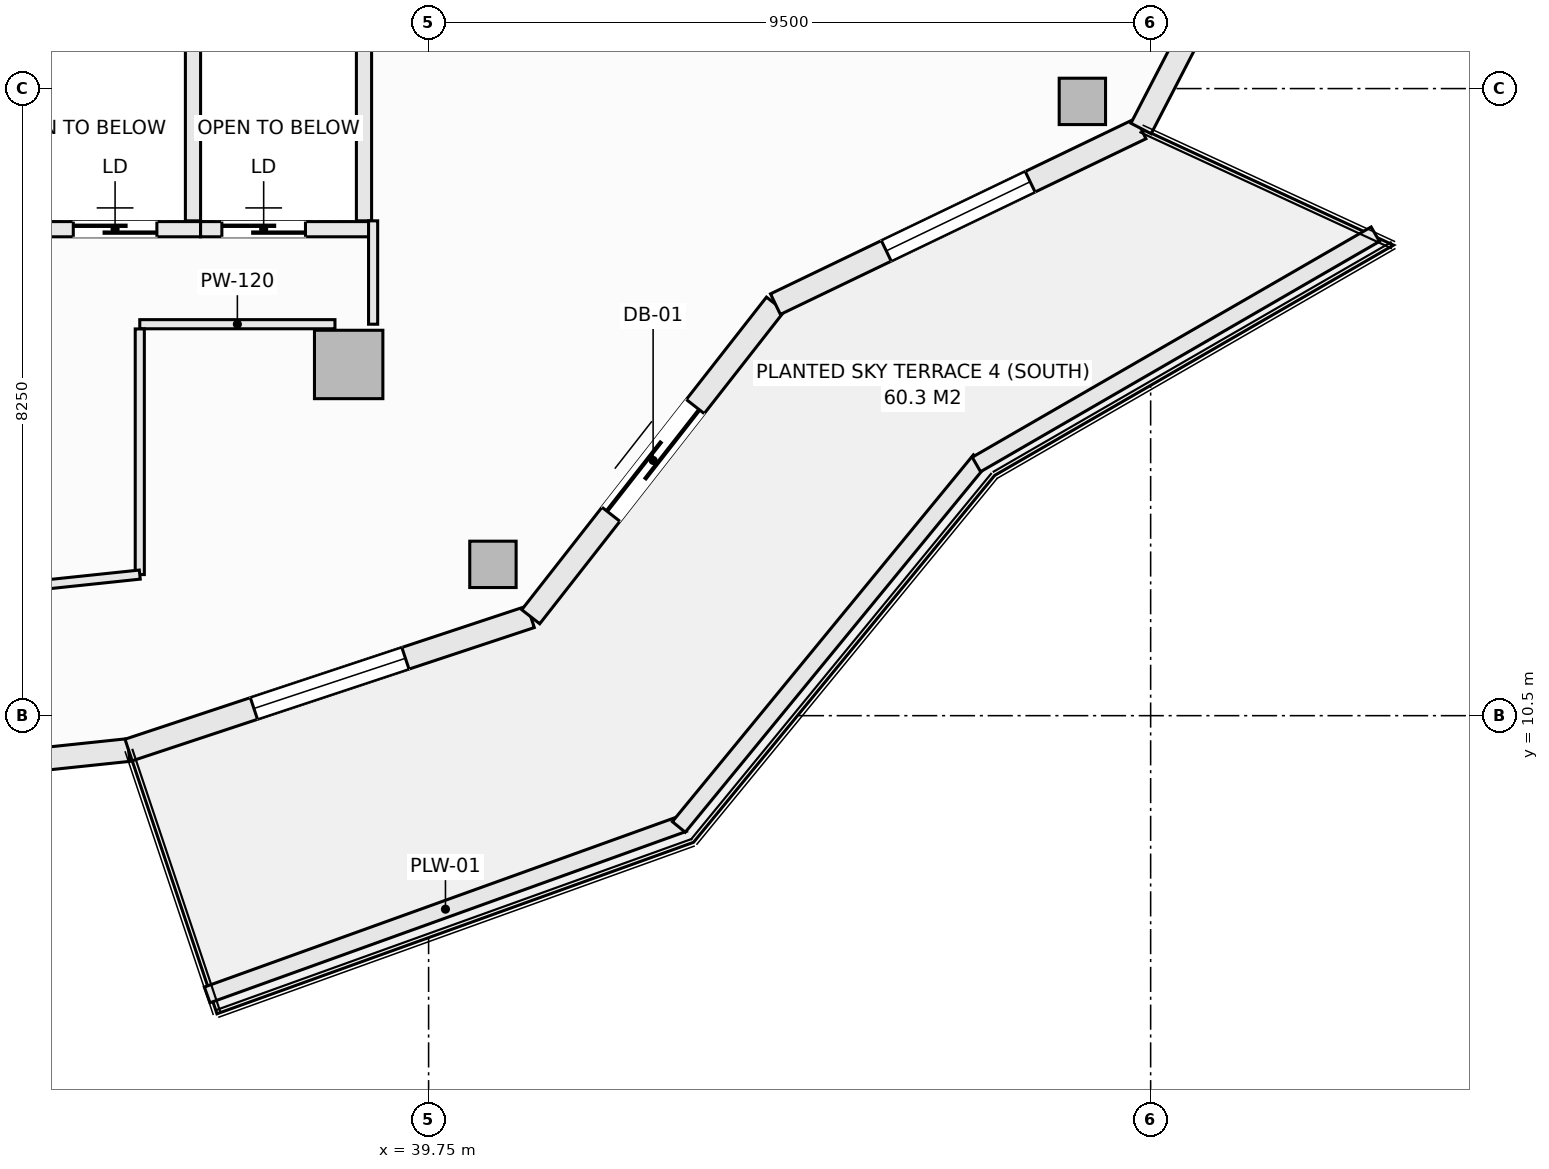
"""IFC4 building model, lengths in metres.
Left out: names, types, materials, properties, quantities, classifications, styles, units other than length and angle.
Written with IfcOpenShell. Run it as: python <this file> out.ifc"""

import sys

from ifc_helpers import new_model, si_unit, direction, frame, frame_2d, origin, origin_2d, place, context, subcontext, project, spatial, rectangle, hollow_rectangle, extrude, element, fill, save


model = new_model("IFC4")
c1 = context("Model", 3, precision=1e-05, world=origin(), true_north=direction((0.0, 1.0)))
c2 = subcontext(c1, "Body", "Model", "MODEL_VIEW")
j1 = project(units=[si_unit("LENGTHUNIT", "METRE"), si_unit("PLANEANGLEUNIT", "RADIAN")], contexts=[c1])
p1 = place(None, origin())
s1 = spatial("IfcSite", under=j1, at=p1, CompositionType="ELEMENT")
p2 = place(p1, origin())
s2 = spatial("IfcBuilding", under=s1, at=p2, CompositionType="ELEMENT")
p3 = place(p2, frame((0.0, 0.0, 142.7)))
s3 = spatial("IfcBuildingStorey", under=s2, at=p3, CompositionType="ELEMENT", Elevation=142.7)
for number, where, z_axis, x_axis in (
    (1, (40.596, 12.49, -0.27), (0.0, 0.0, 1.0), (1.0, 0.0, 0.0)),
    (2, (48.352, 18.581, -0.27), (0.0, 0.0, 1.0), (1.0, 0.0, 0.0)),
):
    element("IfcColumn", number, at=place(p3, frame(where, z_axis=z_axis, x_axis=x_axis)), inside=s3, PredefinedType="COLUMN", context=c2, shape_type="SweptSolid", body=[
        extrude(hollow_rectangle(XDim=0.61, YDim=0.61, WallThickness=0.025, at=origin_2d()), origin(), (0.0, 0.0, 1.0), 3.4),
    ])
p4 = place(p3, frame((38.698, 15.121, -0.27), z_axis=(0.0, 0.0, 1.0), x_axis=(1.0, 0.0, 0.0)))
e3 = element("IfcColumn", 3, at=p4, inside=s3, PredefinedType="COLUMN", context=c2, shape_type="SweptSolid", body=[
    extrude(rectangle(XDim=0.9, YDim=0.9, at=origin_2d()), origin(), (0.0, 0.0, 1.0), 3.4),
])
p5 = place(p3, frame((30.125, 9.45, 0.0), z_axis=(0.0, 0.0, 1.0), x_axis=(0.994496545245, 0.104769372887, 0.0)))
e4 = element("IfcWall", 4, at=p5, inside=s3, PredefinedType="SOLIDWALL", context=c2, shape_type="SweptSolid", body=[
    extrude(rectangle(XDim=5.709, YDim=0.3, at=frame_2d((2.854, 0.0))), origin(), (0.0, 0.0, 1.0), 2.653),
])
p6 = place(p5, frame((1.805, 0.0, 0.74)))
e5 = element("IfcOpeningElement", 5, at=p6, cuts=e4, PredefinedType="OPENING", context=c2, shape_type="SweptSolid", body=[
    extrude(rectangle(XDim=2.1, YDim=1.7, at=frame_2d((1.05, 0.85))), frame((0.0, 0.16, 0.0), z_axis=(0.0, -1.0, 0.0), x_axis=(1.0, 0.0, 0.0)), (0.0, 0.0, 1.0), 0.32),
])
p7 = place(p3, frame((35.803, 10.048, 0.0), z_axis=(0.0, 0.0, 1.0), x_axis=(0.949246811547, 0.314532177636, 0.0)))
e6 = element("IfcWall", 6, at=p7, inside=s3, PredefinedType="SOLIDWALL", context=c2, shape_type="SweptSolid", body=[
    extrude(rectangle(XDim=5.574, YDim=0.3, at=frame_2d((2.787, 0.0))), origin(), (0.0, 0.0, 1.0), 2.653),
])
p8 = place(p7, frame((1.737, 0.0, 0.74)))
e7 = element("IfcOpeningElement", 7, at=p8, cuts=e6, PredefinedType="OPENING", context=c2, shape_type="SweptSolid", body=[
    extrude(rectangle(XDim=2.1, YDim=1.7, at=frame_2d((1.05, 0.85))), frame((0.0, 0.16, 0.0), z_axis=(0.0, -1.0, 0.0), x_axis=(1.0, 0.0, 0.0)), (0.0, 0.0, 1.0), 0.32),
])
p9 = place(p3, frame((41.094, 11.801, 0.0), z_axis=(0.0, 0.0, 1.0), x_axis=(0.616429245738, 0.787410302828, 0.0)))
e8 = element("IfcWall", 8, at=p9, inside=s3, PredefinedType="SOLIDWALL", context=c2, shape_type="SweptSolid", body=[
    extrude(rectangle(XDim=5.223, YDim=0.3, at=frame_2d((2.612, 0.0))), origin(), (0.0, 0.0, 1.0), 2.653),
])
p10 = place(p9, frame((1.712, 0.0, 0.0)))
e9 = element("IfcOpeningElement", 9, at=p10, cuts=e8, PredefinedType="OPENING", context=c2, shape_type="SweptSolid", body=[
    extrude(rectangle(XDim=1.8, YDim=2.25, at=frame_2d((0.9, 1.125))), frame((0.0, 0.16, 0.0), z_axis=(0.0, -1.0, 0.0), x_axis=(1.0, 0.0, 0.0)), (0.0, 0.0, 1.0), 0.32),
])
p11 = place(p3, frame((44.313, 15.914, 0.0), z_axis=(0.0, 0.0, 1.0), x_axis=(0.901353070301, 0.433085029363, 0.0)))
e10 = element("IfcWall", 10, at=p11, inside=s3, PredefinedType="SOLIDWALL", context=c2, shape_type="SweptSolid", body=[
    extrude(rectangle(XDim=5.336, YDim=0.3, at=frame_2d((2.668, 0.0))), origin(), (0.0, 0.0, 1.0), 2.653),
])
p12 = place(p11, frame((1.618, 0.0, 0.74)))
e11 = element("IfcOpeningElement", 11, at=p12, cuts=e10, PredefinedType="OPENING", context=c2, shape_type="SweptSolid", body=[
    extrude(rectangle(XDim=2.1, YDim=1.7, at=frame_2d((1.05, 0.85))), frame((0.0, 0.16, 0.0), z_axis=(0.0, -1.0, 0.0), x_axis=(1.0, 0.0, 0.0)), (0.0, 0.0, 1.0), 0.32),
])
p13 = place(p3, frame((49.123, 18.225, 0.0), z_axis=(0.0, 0.0, 1.0), x_axis=(0.459810251451, 0.888017191647, 0.0)))
e12 = element("IfcWall", 12, at=p13, inside=s3, PredefinedType="SOLIDWALL", context=c2, shape_type="SweptSolid", body=[
    extrude(rectangle(XDim=4.766, YDim=0.3, at=frame_2d((2.383, 0.0))), origin(), (0.0, 0.0, 1.0), 2.653),
])
p14 = place(p13, frame((1.333, 0.0, 0.74)))
e13 = element("IfcOpeningElement", 13, at=p14, cuts=e12, PredefinedType="OPENING", context=c2, shape_type="SweptSolid", body=[
    extrude(rectangle(XDim=2.1, YDim=1.7, at=frame_2d((1.05, 0.85))), frame((0.0, 0.16, 0.0), z_axis=(0.0, -1.0, 0.0), x_axis=(1.0, 0.0, 0.0)), (0.0, 0.0, 1.0), 0.32),
])
p15 = place(p3, frame((36.837, 6.826, 0.0), z_axis=(0.0, 0.0, 1.0), x_axis=(0.940948576924, 0.338549517184, 0.0)))
e14 = element("IfcWall", 14, at=p15, inside=s3, PredefinedType="PARAPET", context=c2, shape_type="SweptSolid", body=[
    extrude(rectangle(XDim=6.664, YDim=0.22, at=frame_2d((3.332, 0.0))), origin(), (0.0, 0.0, 1.0), 0.52),
])
p16 = place(p3, frame((43.042, 9.036, 0.0), z_axis=(0.0, 0.0, 1.0), x_axis=(0.634429234628, 0.77298094818, 0.0)))
e15 = element("IfcWall", 15, at=p16, inside=s3, PredefinedType="PARAPET", context=c2, shape_type="SweptSolid", body=[
    extrude(rectangle(XDim=6.245, YDim=0.22, at=frame_2d((3.123, 0.0))), origin(), (0.0, 0.0, 1.0), 0.52),
])
p17 = place(p3, frame((46.958, 13.805, 0.0), z_axis=(0.0, 0.0, 1.0), x_axis=(0.866058128659, 0.499943314571, 0.0)))
e16 = element("IfcWall", 16, at=p17, inside=s3, PredefinedType="PARAPET", context=c2, shape_type="SweptSolid", body=[
    extrude(rectangle(XDim=6.06, YDim=0.22, at=frame_2d((3.03, 0.0))), origin(), (0.0, 0.0, 1.0), 0.52),
])
p18 = place(p3, frame((34.5, 16.9, 0.0), z_axis=(0.0, 0.0, 1.0), x_axis=(1.0, 0.0, 0.0)))
e17 = element("IfcWall", 17, at=p18, inside=s3, PredefinedType="SOLIDWALL", context=c2, shape_type="SweptSolid", body=[
    extrude(rectangle(XDim=2.25, YDim=0.2, at=frame_2d((1.125, 0.0))), origin(), (0.0, 0.0, 1.0), 3.13),
])
p19 = place(p18, frame((0.575, 0.0, 0.0)))
e18 = element("IfcOpeningElement", 18, at=p19, cuts=e17, PredefinedType="OPENING", context=c2, shape_type="SweptSolid", body=[
    extrude(rectangle(XDim=1.1, YDim=2.2, at=frame_2d((0.55, 1.1))), frame((0.0, 0.11, 0.0), z_axis=(0.0, -1.0, 0.0), x_axis=(1.0, 0.0, 0.0)), (0.0, 0.0, 1.0), 0.22),
])
p20 = place(p3, frame((36.65, 17.01, 0.0), z_axis=(0.0, 0.0, 1.0), x_axis=(0.0, 1.0, 0.0)))
e19 = element("IfcWall", 19, at=p20, inside=s3, PredefinedType="SOLIDWALL", context=c2, shape_type="SweptSolid", body=[
    extrude(rectangle(XDim=2.43, YDim=0.2, at=frame_2d((1.215, 0.0))), origin(), (0.0, 0.0, 1.0), 3.13),
])
p21 = place(p3, frame((36.75, 16.9, 0.0), z_axis=(0.0, 0.0, 1.0), x_axis=(1.0, 0.0, 0.0)))
e20 = element("IfcWall", 20, at=p21, inside=s3, PredefinedType="SOLIDWALL", context=c2, shape_type="SweptSolid", body=[
    extrude(rectangle(XDim=2.25, YDim=0.2, at=frame_2d((1.125, 0.0))), origin(), (0.0, 0.0, 1.0), 3.13),
])
p22 = place(p21, frame((0.28, 0.0, 0.0)))
e21 = element("IfcOpeningElement", 21, at=p22, cuts=e20, PredefinedType="OPENING", context=c2, shape_type="SweptSolid", body=[
    extrude(rectangle(XDim=1.1, YDim=2.2, at=frame_2d((0.55, 1.1))), frame((0.0, 0.11, 0.0), z_axis=(0.0, -1.0, 0.0), x_axis=(1.0, 0.0, 0.0)), (0.0, 0.0, 1.0), 0.22),
])
p23 = place(p3, frame((38.9, 17.01, 0.0), z_axis=(0.0, 0.0, 1.0), x_axis=(0.0, 1.0, 0.0)))
e22 = element("IfcWall", 22, at=p23, inside=s3, PredefinedType="SOLIDWALL", context=c2, shape_type="SweptSolid", body=[
    extrude(rectangle(XDim=2.43, YDim=0.2, at=frame_2d((1.215, 0.0))), origin(), (0.0, 0.0, 1.0), 3.13),
])
p24 = place(p3, frame((39.02, 15.65, 0.0), z_axis=(0.0, 0.0, 1.0), x_axis=(0.0, 1.0, 0.0)))
e23 = element("IfcWall", 23, at=p24, inside=s3, PredefinedType="PARTITIONING", context=c2, shape_type="SweptSolid", body=[
    extrude(rectangle(XDim=1.36, YDim=0.12, at=frame_2d((0.68, 0.0))), origin(), (0.0, 0.0, 1.0), 2.505),
])
p25 = place(p3, frame((35.95, 15.65, 0.0), z_axis=(0.0, 0.0, 1.0), x_axis=(1.0, 0.0, 0.0)))
e24 = element("IfcWall", 24, at=p25, inside=s3, PredefinedType="PARTITIONING", context=c2, shape_type="SweptSolid", body=[
    extrude(rectangle(XDim=2.568, YDim=0.12, at=frame_2d((1.284, 0.0))), origin(), (0.0, 0.0, 1.0), 3.13),
])
p26 = place(p3, frame((35.95, 12.356, 0.0), z_axis=(0.0, 0.0, 1.0), x_axis=(0.0, 1.0, 0.0)))
e25 = element("IfcWall", 25, at=p26, inside=s3, PredefinedType="PARTITIONING", context=c2, shape_type="SweptSolid", body=[
    extrude(rectangle(XDim=3.232, YDim=0.12, at=frame_2d((1.616, 0.0))), origin(), (0.0, 0.0, 1.0), 3.13),
])
p27 = place(p3, frame((30.195, 11.75, 0.0), z_axis=(0.0, 0.0, 1.0), x_axis=(0.994502215954, 0.104715531139, 0.0)))
e26 = element("IfcWall", 26, at=p27, inside=s3, PredefinedType="PARTITIONING", context=c2, shape_type="SweptSolid", body=[
    extrude(rectangle(XDim=5.787, YDim=0.12, at=frame_2d((2.893, 0.0))), origin(), (0.0, 0.0, 1.0), 3.13),
])
p28 = place(p27, frame((2.758, 0.0, 0.0)))
e27 = element("IfcOpeningElement", 27, at=p28, cuts=e26, PredefinedType="OPENING", context=c2, shape_type="SweptSolid", body=[
    extrude(rectangle(XDim=0.95, YDim=2.1, at=frame_2d((0.475, 1.05))), frame((0.0, 0.07, 0.0), z_axis=(0.0, -1.0, 0.0), x_axis=(1.0, 0.0, 0.0)), (0.0, 0.0, 1.0), 0.14),
])
p29 = place(p8, origin())
e28 = element("IfcWindow", 28, at=p29, inside=s3, PartitioningType="SINGLE_PANEL", PredefinedType="WINDOW", context=c2, shape_type="SweptSolid", body=[
    extrude(rectangle(XDim=2.1, YDim=1.7, at=frame_2d((1.05, 0.85))), frame((0.0, 0.03, 0.0), z_axis=(0.0, -1.0, 0.0), x_axis=(1.0, 0.0, 0.0)), (0.0, 0.0, 1.0), 0.06),
])
fill(e7, e28)
p30 = place(p10, frame((1.8, 0.0, 0.0), z_axis=(0.0, 0.0, 1.0), x_axis=(-1.0, 0.0, 0.0)))
e29 = element("IfcDoor", 29, at=p30, inside=s3, OperationType="SLIDING_TO_LEFT", PredefinedType="DOOR", context=c2, shape_type="SweptSolid", body=[
    extrude(rectangle(XDim=1.8, YDim=2.25, at=frame_2d((0.9, 1.125))), frame((0.0, 0.025, 0.0), z_axis=(0.0, -1.0, 0.0), x_axis=(1.0, 0.0, 0.0)), (0.0, 0.0, 1.0), 0.05),
])
fill(e9, e29)
p31 = place(p12, origin())
e30 = element("IfcWindow", 30, at=p31, inside=s3, PartitioningType="SINGLE_PANEL", PredefinedType="WINDOW", context=c2, shape_type="SweptSolid", body=[
    extrude(rectangle(XDim=2.1, YDim=1.7, at=frame_2d((1.05, 0.85))), frame((0.0, 0.03, 0.0), z_axis=(0.0, -1.0, 0.0), x_axis=(1.0, 0.0, 0.0)), (0.0, 0.0, 1.0), 0.06),
])
fill(e11, e30)
p32 = place(p19, origin())
e31 = element("IfcDoor", 31, at=p32, inside=s3, OperationType="SLIDING_TO_LEFT", PredefinedType="DOOR", context=c2, shape_type="SweptSolid", body=[
    extrude(rectangle(XDim=1.1, YDim=2.2, at=frame_2d((0.55, 1.1))), frame((0.0, 0.025, 0.0), z_axis=(0.0, -1.0, 0.0), x_axis=(1.0, 0.0, 0.0)), (0.0, 0.0, 1.0), 0.05),
])
fill(e18, e31)
p33 = place(p22, origin())
e32 = element("IfcDoor", 32, at=p33, inside=s3, OperationType="SLIDING_TO_LEFT", PredefinedType="DOOR", context=c2, shape_type="SweptSolid", body=[
    extrude(rectangle(XDim=1.1, YDim=2.2, at=frame_2d((0.55, 1.1))), frame((0.0, 0.025, 0.0), z_axis=(0.0, -1.0, 0.0), x_axis=(1.0, 0.0, 0.0)), (0.0, 0.0, 1.0), 0.05),
])
fill(e21, e32)
save(model, sys.argv[1])
